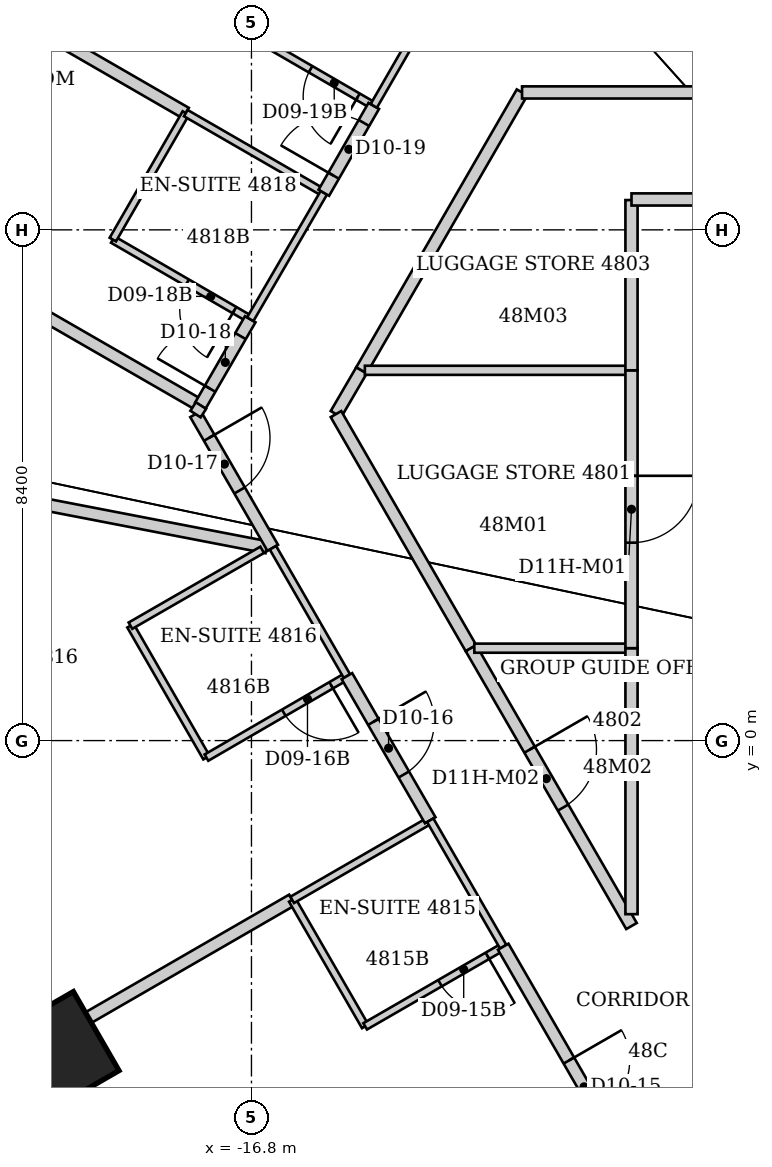
"""IFC4 building model, lengths in metres.
Left out: names, types, materials, properties, quantities, classifications, styles, units other than length and angle.
Written with IfcOpenShell. Run it as: python <this file> out.ifc"""

import sys

from ifc_helpers import new_model, si_unit, direction, frame, frame_2d, origin, origin_2d, place, context, subcontext, project, spatial, rectangle, extrude, element, fill, save


model = new_model("IFC4")
c1 = context("Model", 3, precision=1e-05, world=origin(), true_north=direction((0.0, 1.0)))
c2 = subcontext(c1, "Body", "Model", "MODEL_VIEW")
j1 = project(units=[si_unit("LENGTHUNIT", "METRE"), si_unit("PLANEANGLEUNIT", "RADIAN")], contexts=[c1])
p1 = place(None, origin())
s1 = spatial("IfcSite", under=j1, at=p1, CompositionType="ELEMENT")
p2 = place(p1, origin())
s2 = spatial("IfcBuilding", under=s1, at=p2, CompositionType="ELEMENT")
p3 = place(p2, frame((0.0, 0.0, 194.6)))
s3 = spatial("IfcBuildingStorey", under=s2, at=p3, CompositionType="ELEMENT", Elevation=194.6)
p4 = place(p3, frame((-20.003, -5.153, 0.0), z_axis=(0.0, 0.0, 1.0), x_axis=(-0.866025403784, -0.5, 0.0)))
e1 = element("IfcColumn", 1, at=p4, inside=s3, PredefinedType="COLUMN", context=c2, shape_type="SweptSolid", body=[
    extrude(rectangle(XDim=1.5, YDim=1.5, at=origin_2d()), origin(), (0.0, 0.0, 1.0), 3.8),
])
p5 = place(p3, frame((-27.041, 5.204, 0.0), z_axis=(0.0, 0.0, 1.0), x_axis=(0.981884490433, -0.18948046719, 0.0)))
e2 = element("IfcWall", 2, at=p5, inside=s3, PredefinedType="PARTITIONING", context=c2, shape_type="SweptSolid", body=[
    extrude(rectangle(XDim=10.684, YDim=0.2, at=frame_2d((5.342, 0.0))), origin(), (0.0, 0.0, 1.0), 3.64),
])
p6 = place(p3, frame((-22.866, 13.2, 0.0), z_axis=(0.0, 0.0, 1.0), x_axis=(0.865937714159, -0.500151852138, 0.0)))
e3 = element("IfcWall", 3, at=p6, inside=s3, PredefinedType="PARTITIONING", context=c2, shape_type="SweptSolid", body=[
    extrude(rectangle(XDim=5.758, YDim=0.2, at=frame_2d((2.879, 0.0))), origin(), (0.0, 0.0, 1.0), 2.878),
])
p7 = place(p3, frame((-21.116, -5.5, 0.0), z_axis=(0.0, 0.0, 1.0), x_axis=(0.865919350456, 0.50018364478, 0.0)))
e4 = element("IfcWall", 4, at=p7, inside=s3, PredefinedType="PARTITIONING", context=c2, shape_type="SweptSolid", body=[
    extrude(rectangle(XDim=5.758, YDim=0.2, at=frame_2d((2.879, 0.0))), origin(), (0.0, 0.0, 1.0), 3.64),
])
p8 = place(p3, frame((-20.97, 7.43, 0.0), z_axis=(0.0, 0.0, 1.0), x_axis=(0.866325681624, -0.499479542482, 0.0)))
e5 = element("IfcWall", 5, at=p8, inside=s3, PredefinedType="PARTITIONING", context=c2, shape_type="SweptSolid", body=[
    extrude(rectangle(XDim=3.829, YDim=0.2, at=frame_2d((1.914, 0.0))), origin(), (0.0, 0.0, 1.0), 3.64),
])
p9 = place(p3, frame((-19.08, 8.24, 0.0), z_axis=(0.0, 0.0, 1.0), x_axis=(0.865155281359, -0.50150407689, 0.0)))
e6 = element("IfcWall", 6, at=p9, inside=s3, PredefinedType="PARTITIONING", context=c2, shape_type="SweptSolid", body=[
    extrude(rectangle(XDim=2.612, YDim=0.12, at=frame_2d((1.306, 0.0))), origin(), (0.0, 0.0, 1.0), 3.64),
])
p10 = place(p9, frame((1.412, 0.0, 0.0)))
e7 = element("IfcOpeningElement", 7, at=p10, cuts=e6, PredefinedType="OPENING", context=c2, shape_type="SweptSolid", body=[
    extrude(rectangle(XDim=0.9, YDim=2.03, at=frame_2d((0.45, 1.015))), frame((0.0, 0.06, 0.0), z_axis=(0.0, -1.0, 0.0), x_axis=(1.0, 0.0, 0.0)), (0.0, 0.0, 1.0), 0.12),
])
p11 = place(p3, frame((-18.79, 1.89, 0.0), z_axis=(0.0, 0.0, 1.0), x_axis=(0.499159685399, -0.866510016372, 0.0)))
e8 = element("IfcWall", 8, at=p11, inside=s3, PredefinedType="PARTITIONING", context=c2, shape_type="SweptSolid", body=[
    extrude(rectangle(XDim=2.504, YDim=0.12, at=frame_2d((1.252, 0.0))), origin(), (0.0, 0.0, 1.0), 3.64),
])
p12 = place(p3, frame((-17.88, 10.32, 0.0), z_axis=(0.0, 0.0, 1.0), x_axis=(-0.499769390944, -0.866158505053, 0.0)))
e9 = element("IfcWall", 9, at=p12, inside=s3, PredefinedType="PARTITIONING", context=c2, shape_type="SweptSolid", body=[
    extrude(rectangle(XDim=2.402, YDim=0.12, at=frame_2d((1.201, 0.0))), origin(), (0.0, 0.0, 1.0), 3.64),
])
p13 = place(p3, frame((-17.88, 10.32, 0.0), z_axis=(0.0, 0.0, 1.0), x_axis=(0.866114241029, -0.499846097802, 0.0)))
e10 = element("IfcWall", 10, at=p13, inside=s3, PredefinedType="PARTITIONING", context=c2, shape_type="SweptSolid", body=[
    extrude(rectangle(XDim=2.621, YDim=0.12, at=frame_2d((1.311, 0.0))), origin(), (0.0, 0.0, 1.0), 2.878),
])
p14 = place(p3, frame((-17.72, 5.37, 0.0), z_axis=(0.0, 0.0, 1.0), x_axis=(0.499922110319, -0.866070368743, 0.0)))
e11 = element("IfcWall", 11, at=p14, inside=s3, PredefinedType="PARTITIONING", context=c2, shape_type="SweptSolid", body=[
    extrude(rectangle(XDim=2.541, YDim=0.2, at=frame_2d((1.27, 0.0))), origin(), (0.0, 0.0, 1.0), 3.64),
])
p15 = place(p14, frame((0.45, 0.0, 0.0)))
e12 = element("IfcOpeningElement", 12, at=p15, cuts=e11, PredefinedType="OPENING", context=c2, shape_type="SweptSolid", body=[
    extrude(rectangle(XDim=1.0, YDim=2.13, at=frame_2d((0.5, 1.065))), frame((0.0, 0.1, 0.0), z_axis=(0.0, -1.0, 0.0), x_axis=(1.0, 0.0, 0.0)), (0.0, 0.0, 1.0), 0.2),
])
p16 = place(p3, frame((-17.64, 5.51, 0.0), z_axis=(0.0, 0.0, 1.0), x_axis=(0.500014611105, 0.866016967894, 0.0)))
e13 = element("IfcWall", 13, at=p16, inside=s3, PredefinedType="PARTITIONING", context=c2, shape_type="SweptSolid", body=[
    extrude(rectangle(XDim=1.64, YDim=0.2, at=frame_2d((0.82, 0.0))), origin(), (0.0, 0.0, 1.0), 3.64),
])
p17 = place(p16, frame((0.32, 0.0, 0.0)))
e14 = element("IfcOpeningElement", 14, at=p17, cuts=e13, PredefinedType="OPENING", context=c2, shape_type="SweptSolid", body=[
    extrude(rectangle(XDim=1.0, YDim=2.13, at=frame_2d((0.5, 1.065))), frame((0.0, 0.1, 0.0), z_axis=(0.0, -1.0, 0.0), x_axis=(1.0, 0.0, 0.0)), (0.0, 0.0, 1.0), 0.2),
])
p18 = place(p3, frame((-17.63, 5.51, 0.0), z_axis=(0.0, 0.0, 1.0), x_axis=(-0.541424846284, -0.840749151547, 0.0)))
e15 = element("IfcWall", 15, at=p18, inside=s3, PredefinedType="PARTITIONING", context=c2, shape_type="SweptSolid", body=[
    extrude(rectangle(XDim=0.167, YDim=0.2, at=frame_2d((0.083, 0.0))), origin(), (0.0, 0.0, 1.0), 3.64),
])
p19 = place(p3, frame((-17.54, -0.28, 0.0), z_axis=(0.0, 0.0, 1.0), x_axis=(0.86498992408, 0.501789229896, 0.0)))
e16 = element("IfcWall", 16, at=p19, inside=s3, PredefinedType="PARTITIONING", context=c2, shape_type="SweptSolid", body=[
    extrude(rectangle(XDim=2.671, YDim=0.12, at=frame_2d((1.335, 0.0))), origin(), (0.0, 0.0, 1.0), 3.64),
])
p20 = place(p19, frame((1.47, 0.0, 0.0)))
e17 = element("IfcOpeningElement", 17, at=p20, cuts=e16, PredefinedType="OPENING", context=c2, shape_type="SweptSolid", body=[
    extrude(rectangle(XDim=0.9, YDim=2.03, at=frame_2d((0.45, 1.015))), frame((0.0, 0.06, 0.0), z_axis=(0.0, -1.0, 0.0), x_axis=(1.0, 0.0, 0.0)), (0.0, 0.0, 1.0), 0.12),
])
p21 = place(p3, frame((-17.05, 11.75, 0.0), z_axis=(0.0, 0.0, 1.0), x_axis=(0.865155281359, -0.50150407689, 0.0)))
e18 = element("IfcWall", 18, at=p21, inside=s3, PredefinedType="PARTITIONING", context=c2, shape_type="SweptSolid", body=[
    extrude(rectangle(XDim=2.612, YDim=0.12, at=frame_2d((1.306, 0.0))), origin(), (0.0, 0.0, 1.0), 3.64),
])
p22 = place(p21, frame((1.412, 0.0, 0.0)))
e19 = element("IfcOpeningElement", 19, at=p22, cuts=e18, PredefinedType="OPENING", context=c2, shape_type="SweptSolid", body=[
    extrude(rectangle(XDim=0.9, YDim=2.03, at=frame_2d((0.45, 1.015))), frame((0.0, 0.06, 0.0), z_axis=(0.0, -1.0, 0.0), x_axis=(1.0, 0.0, 0.0)), (0.0, 0.0, 1.0), 0.12),
])
p23 = place(p3, frame((-16.82, 6.93, 0.0), z_axis=(0.0, 0.0, 1.0), x_axis=(0.502810888564, 0.864396442809, 0.0)))
e20 = element("IfcWall", 20, at=p23, inside=s3, PredefinedType="PARTITIONING", context=c2, shape_type="SweptSolid", body=[
    extrude(rectangle(XDim=2.406, YDim=0.12, at=frame_2d((1.203, 0.0))), origin(), (0.0, 0.0, 1.0), 3.64),
])
p24 = place(p3, frame((-16.624, 3.138, 0.0), z_axis=(0.0, 0.0, 1.0), x_axis=(-0.866525185869, -0.499133351175, 0.0)))
e21 = element("IfcWall", 21, at=p24, inside=s3, PredefinedType="PARTITIONING", context=c2, shape_type="SweptSolid", body=[
    extrude(rectangle(XDim=2.5, YDim=0.12, at=frame_2d((1.25, 0.0))), origin(), (0.0, 0.0, 1.0), 3.038),
])
p25 = place(p3, frame((-16.447, 3.172, 0.0), z_axis=(0.0, 0.0, 1.0), x_axis=(0.499242543719, -0.86646227993, 0.0)))
e22 = element("IfcWall", 22, at=p25, inside=s3, PredefinedType="PARTITIONING", context=c2, shape_type="SweptSolid", body=[
    extrude(rectangle(XDim=2.437, YDim=0.12, at=frame_2d((1.219, 0.0))), origin(), (0.0, 0.0, 1.0), 3.64),
])
p26 = place(p3, frame((-16.13, -2.62, 0.0), z_axis=(0.0, 0.0, 1.0), x_axis=(0.499737123639, -0.866177122335, 0.0)))
e23 = element("IfcWall", 23, at=p26, inside=s3, PredefinedType="PARTITIONING", context=c2, shape_type="SweptSolid", body=[
    extrude(rectangle(XDim=2.401, YDim=0.12, at=frame_2d((1.201, 0.0))), origin(), (0.0, 0.0, 1.0), 3.64),
])
p27 = place(p3, frame((-16.13, -2.62, 0.0), z_axis=(0.0, 0.0, 1.0), x_axis=(0.866114241029, 0.499846097802, 0.0)))
e24 = element("IfcWall", 24, at=p27, inside=s3, PredefinedType="PARTITIONING", context=c2, shape_type="SweptSolid", body=[
    extrude(rectangle(XDim=2.621, YDim=0.12, at=frame_2d((1.311, 0.0))), origin(), (0.0, 0.0, 1.0), 3.64),
])
p28 = place(p3, frame((-15.61, 9.01, 0.0), z_axis=(0.0, 0.0, 1.0), x_axis=(0.498354254121, 0.866973492905, 0.0)))
e25 = element("IfcWall", 25, at=p28, inside=s3, PredefinedType="PARTITIONING", context=c2, shape_type="SweptSolid", body=[
    extrude(rectangle(XDim=1.648, YDim=0.2, at=frame_2d((0.824, 0.0))), origin(), (0.0, 0.0, 1.0), 3.64),
])
p29 = place(p28, frame((0.324, 0.0, 0.0)))
e26 = element("IfcOpeningElement", 26, at=p29, cuts=e25, PredefinedType="OPENING", context=c2, shape_type="SweptSolid", body=[
    extrude(rectangle(XDim=1.0, YDim=2.13, at=frame_2d((0.5, 1.065))), frame((0.0, 0.1, 0.0), z_axis=(0.0, -1.0, 0.0), x_axis=(1.0, 0.0, 0.0)), (0.0, 0.0, 1.0), 0.2),
])
p30 = place(p3, frame((-15.41, 5.37, 0.0), z_axis=(0.0, 0.0, 1.0), x_axis=(0.503943891868, 0.863736391412, 0.0)))
e27 = element("IfcWall", 27, at=p30, inside=s3, PredefinedType="PARTITIONING", context=c2, shape_type="SweptSolid", body=[
    extrude(rectangle(XDim=0.833, YDim=0.2, at=frame_2d((0.417, 0.0))), origin(), (0.0, 0.0, 1.0), 3.64),
])
p31 = place(p3, frame((-15.23, 1.06, 0.0), z_axis=(0.0, 0.0, 1.0), x_axis=(0.500406860043, -0.865790375565, 0.0)))
e28 = element("IfcWall", 28, at=p31, inside=s3, PredefinedType="PARTITIONING", context=c2, shape_type="SweptSolid", body=[
    extrude(rectangle(XDim=2.738, YDim=0.2, at=frame_2d((1.369, 0.0))), origin(), (0.0, 0.0, 1.0), 3.64),
])
p32 = place(p31, frame((0.869, 0.0, 0.0)))
e29 = element("IfcOpeningElement", 29, at=p32, cuts=e28, PredefinedType="OPENING", context=c2, shape_type="SweptSolid", body=[
    extrude(rectangle(XDim=1.0, YDim=2.13, at=frame_2d((0.5, 1.065))), frame((0.0, 0.1, 0.0), z_axis=(0.0, -1.0, 0.0), x_axis=(1.0, 0.0, 0.0)), (0.0, 0.0, 1.0), 0.2),
])
p33 = place(p3, frame((-14.99, 6.09, 0.0), z_axis=(0.0, 0.0, 1.0), x_axis=(0.500213626659, 0.86590203124, 0.0)))
e30 = element("IfcWall", 30, at=p33, inside=s3, PredefinedType="PARTITIONING", context=c2, shape_type="SweptSolid", body=[
    extrude(rectangle(XDim=5.278, YDim=0.2, at=frame_2d((2.639, 0.0))), origin(), (0.0, 0.0, 1.0), 3.64),
])
p34 = place(p3, frame((-14.935, 6.09, 0.0), z_axis=(0.0, 0.0, 1.0), x_axis=(1.0, 0.0, 0.0)))
e31 = element("IfcWall", 31, at=p34, inside=s3, PredefinedType="PARTITIONING", context=c2, shape_type="SweptSolid", body=[
    extrude(rectangle(XDim=4.385, YDim=0.15, at=frame_2d((2.192, 0.0))), origin(), (0.0, 0.0, 1.0), 3.64),
])
p35 = place(p3, frame((-14.93, -4.7, 0.0), z_axis=(0.0, 0.0, 1.0), x_axis=(0.866114241029, 0.499846097802, 0.0)))
e32 = element("IfcWall", 32, at=p35, inside=s3, PredefinedType="PARTITIONING", context=c2, shape_type="SweptSolid", body=[
    extrude(rectangle(XDim=2.621, YDim=0.12, at=frame_2d((1.311, 0.0))), origin(), (0.0, 0.0, 1.0), 3.64),
])
p36 = place(p35, frame((1.421, 0.0, 0.0)))
e33 = element("IfcOpeningElement", 33, at=p36, cuts=e32, PredefinedType="OPENING", context=c2, shape_type="SweptSolid", body=[
    extrude(rectangle(XDim=0.9, YDim=2.03, at=frame_2d((0.45, 1.015))), frame((0.0, 0.06, 0.0), z_axis=(0.0, -1.0, 0.0), x_axis=(1.0, 0.0, 0.0)), (0.0, 0.0, 1.0), 0.12),
])
p37 = place(p3, frame((-14.789, 10.439, 0.0), z_axis=(0.0, 0.0, 1.0), x_axis=(0.499942119333, 0.866058818624, 0.0)))
e34 = element("IfcWall", 34, at=p37, inside=s3, PredefinedType="PARTITIONING", context=c2, shape_type="SweptSolid", body=[
    extrude(rectangle(XDim=2.437, YDim=0.12, at=frame_2d((1.219, 0.0))), origin(), (0.0, 0.0, 1.0), 3.64),
])
p38 = place(p3, frame((-13.86, -1.31, 0.0), z_axis=(0.0, 0.0, 1.0), x_axis=(0.499813401482, -0.866133109688, 0.0)))
e35 = element("IfcWall", 35, at=p38, inside=s3, PredefinedType="PARTITIONING", context=c2, shape_type="SweptSolid", body=[
    extrude(rectangle(XDim=2.401, YDim=0.12, at=frame_2d((1.201, 0.0))), origin(), (0.0, 0.0, 1.0), 3.64),
])
p39 = place(p3, frame((-13.19, 1.52, 0.0), z_axis=(0.0, 0.0, 1.0), x_axis=(-0.499513190454, 0.866306281036, 0.0)))
e36 = element("IfcWall", 36, at=p39, inside=s3, PredefinedType="PARTITIONING", context=c2, shape_type="SweptSolid", body=[
    extrude(rectangle(XDim=4.444, YDim=0.2, at=frame_2d((2.222, 0.0))), origin(), (0.0, 0.0, 1.0), 3.64),
])
p40 = place(p3, frame((-12.66, -3.39, 0.0), z_axis=(0.0, 0.0, 1.0), x_axis=(0.499755544815, -0.866166494057, 0.0)))
e37 = element("IfcWall", 37, at=p40, inside=s3, PredefinedType="PARTITIONING", context=c2, shape_type="SweptSolid", body=[
    extrude(rectangle(XDim=5.323, YDim=0.2, at=frame_2d((2.661, 0.0))), origin(), (0.0, 0.0, 1.0), 3.64),
])
p41 = place(p40, frame((2.161, 0.0, 0.0)))
e38 = element("IfcOpeningElement", 38, at=p41, cuts=e37, PredefinedType="OPENING", context=c2, shape_type="SweptSolid", body=[
    extrude(rectangle(XDim=1.0, YDim=2.13, at=frame_2d((0.5, 1.065))), frame((0.0, 0.1, 0.0), z_axis=(0.0, -1.0, 0.0), x_axis=(1.0, 0.0, 0.0)), (0.0, 0.0, 1.0), 0.2),
])
p42 = place(p3, frame((-12.35, 10.66, 0.0), z_axis=(0.0, 0.0, 1.0), x_axis=(1.0, 0.0, 0.0)))
e39 = element("IfcWall", 39, at=p42, inside=s3, PredefinedType="PARTITIONING", context=c2, shape_type="SweptSolid", body=[
    extrude(rectangle(XDim=7.75, YDim=0.2, at=frame_2d((3.875, 0.0))), origin(), (0.0, 0.0, 1.0), 3.64),
])
p43 = place(p42, frame((3.325, 0.0, 0.0)))
e40 = element("IfcOpeningElement", 40, at=p43, cuts=e39, PredefinedType="OPENING", context=c2, shape_type="SweptSolid", body=[
    extrude(rectangle(XDim=1.1, YDim=2.2, at=frame_2d((0.55, 1.1))), frame((0.0, 0.1, 0.0), z_axis=(0.0, -1.0, 0.0), x_axis=(1.0, 0.0, 0.0)), (0.0, 0.0, 1.0), 0.2),
])
p44 = place(p3, frame((-10.55, -3.05, 0.0), z_axis=(0.0, 0.0, 1.0), x_axis=(-0.500193590286, 0.865913605527, 0.0)))
e41 = element("IfcWall", 41, at=p44, inside=s3, PredefinedType="PARTITIONING", context=c2, shape_type="SweptSolid", body=[
    extrude(rectangle(XDim=5.278, YDim=0.2, at=frame_2d((2.639, 0.0))), origin(), (0.0, 0.0, 1.0), 3.64),
])
p45 = place(p44, frame((2.25, 0.0, 0.0)))
e42 = element("IfcOpeningElement", 42, at=p45, cuts=e41, PredefinedType="OPENING", context=c2, shape_type="SweptSolid", body=[
    extrude(rectangle(XDim=1.1, YDim=2.2, at=frame_2d((0.55, 1.1))), frame((0.0, 0.1, 0.0), z_axis=(0.0, -1.0, 0.0), x_axis=(1.0, 0.0, 0.0)), (0.0, 0.0, 1.0), 0.2),
])
p46 = place(p3, frame((-10.55, 1.52, 0.0), z_axis=(0.0, 0.0, 1.0), x_axis=(-1.0, 0.0, 0.0)))
e43 = element("IfcWall", 43, at=p46, inside=s3, PredefinedType="PARTITIONING", context=c2, shape_type="SweptSolid", body=[
    extrude(rectangle(XDim=2.585, YDim=0.15, at=frame_2d((1.292, 0.0))), origin(), (0.0, 0.0, 1.0), 3.64),
])
p47 = place(p3, frame((-10.55, 1.52, 0.0), z_axis=(0.0, 0.0, 1.0), x_axis=(0.0, -1.0, 0.0)))
e44 = element("IfcWall", 44, at=p47, inside=s3, PredefinedType="PARTITIONING", context=c2, shape_type="SweptSolid", body=[
    extrude(rectangle(XDim=4.375, YDim=0.2, at=frame_2d((2.188, 0.0))), origin(), (0.0, 0.0, 1.0), 3.64),
])
p48 = place(p3, frame((-10.55, 6.09, 0.0), z_axis=(0.0, 0.0, 1.0), x_axis=(0.0, -1.0, 0.0)))
e45 = element("IfcWall", 45, at=p48, inside=s3, PredefinedType="PARTITIONING", context=c2, shape_type="SweptSolid", body=[
    extrude(rectangle(XDim=4.57, YDim=0.2, at=frame_2d((2.285, 0.0))), origin(), (0.0, 0.0, 1.0), 3.64),
])
p49 = place(p48, frame((1.735, 0.0, 0.0)))
e46 = element("IfcOpeningElement", 46, at=p49, cuts=e45, PredefinedType="OPENING", context=c2, shape_type="SweptSolid", body=[
    extrude(rectangle(XDim=1.1, YDim=2.2, at=frame_2d((0.55, 1.1))), frame((0.0, 0.1, 0.0), z_axis=(0.0, -1.0, 0.0), x_axis=(1.0, 0.0, 0.0)), (0.0, 0.0, 1.0), 0.2),
])
p50 = place(p3, frame((-10.55, 8.89, 0.0), z_axis=(0.0, 0.0, 1.0), x_axis=(0.0, -1.0, 0.0)))
e47 = element("IfcWall", 47, at=p50, inside=s3, PredefinedType="PARTITIONING", context=c2, shape_type="SweptSolid", body=[
    extrude(rectangle(XDim=2.8, YDim=0.2, at=frame_2d((1.4, 0.0))), origin(), (0.0, 0.0, 1.0), 3.64),
])
p51 = place(p3, frame((-4.6, 8.9, 0.0), z_axis=(0.0, 0.0, 1.0), x_axis=(-1.0, 0.0, 0.0)))
e48 = element("IfcWall", 48, at=p51, inside=s3, PredefinedType="PARTITIONING", context=c2, shape_type="SweptSolid", body=[
    extrude(rectangle(XDim=5.95, YDim=0.2, at=frame_2d((2.975, 0.0))), origin(), (0.0, 0.0, 1.0), 3.64),
])
p52 = place(p41, origin())
e49 = element("IfcDoor", 49, at=p52, inside=s3, OperationType="SINGLE_SWING_LEFT", PredefinedType="DOOR", context=c2, shape_type="SweptSolid", body=[
    extrude(rectangle(XDim=1.0, YDim=2.13, at=frame_2d((0.5, 1.065))), frame((0.0, 0.025, 0.0), z_axis=(0.0, -1.0, 0.0), x_axis=(1.0, 0.0, 0.0)), (0.0, 0.0, 1.0), 0.05),
])
fill(e38, e49)
p53 = place(p36, origin())
e50 = element("IfcDoor", 50, at=p53, inside=s3, OperationType="SINGLE_SWING_RIGHT", PredefinedType="DOOR", context=c2, shape_type="SweptSolid", body=[
    extrude(rectangle(XDim=0.9, YDim=2.03, at=frame_2d((0.45, 1.015))), frame((0.0, 0.025, 0.0), z_axis=(0.0, -1.0, 0.0), x_axis=(1.0, 0.0, 0.0)), (0.0, 0.0, 1.0), 0.05),
])
fill(e33, e50)
p54 = place(p32, origin())
e51 = element("IfcDoor", 51, at=p54, inside=s3, OperationType="SINGLE_SWING_LEFT", PredefinedType="DOOR", context=c2, shape_type="SweptSolid", body=[
    extrude(rectangle(XDim=1.0, YDim=2.13, at=frame_2d((0.5, 1.065))), frame((0.0, 0.025, 0.0), z_axis=(0.0, -1.0, 0.0), x_axis=(1.0, 0.0, 0.0)), (0.0, 0.0, 1.0), 0.05),
])
fill(e29, e51)
p55 = place(p20, origin())
e52 = element("IfcDoor", 52, at=p55, inside=s3, OperationType="SINGLE_SWING_RIGHT", PredefinedType="DOOR", context=c2, shape_type="SweptSolid", body=[
    extrude(rectangle(XDim=0.9, YDim=2.03, at=frame_2d((0.45, 1.015))), frame((0.0, 0.025, 0.0), z_axis=(0.0, -1.0, 0.0), x_axis=(1.0, 0.0, 0.0)), (0.0, 0.0, 1.0), 0.05),
])
fill(e17, e52)
p56 = place(p15, origin())
e53 = element("IfcDoor", 53, at=p56, inside=s3, OperationType="SINGLE_SWING_LEFT", PredefinedType="DOOR", context=c2, shape_type="SweptSolid", body=[
    extrude(rectangle(XDim=1.0, YDim=2.13, at=frame_2d((0.5, 1.065))), frame((0.0, 0.025, 0.0), z_axis=(0.0, -1.0, 0.0), x_axis=(1.0, 0.0, 0.0)), (0.0, 0.0, 1.0), 0.05),
])
fill(e12, e53)
p57 = place(p17, origin())
e54 = element("IfcDoor", 54, at=p57, inside=s3, OperationType="SINGLE_SWING_LEFT", PredefinedType="DOOR", context=c2, shape_type="SweptSolid", body=[
    extrude(rectangle(XDim=1.0, YDim=2.13, at=frame_2d((0.5, 1.065))), frame((0.0, 0.025, 0.0), z_axis=(0.0, -1.0, 0.0), x_axis=(1.0, 0.0, 0.0)), (0.0, 0.0, 1.0), 0.05),
])
fill(e14, e54)
p58 = place(p10, origin())
e55 = element("IfcDoor", 55, at=p58, inside=s3, OperationType="SINGLE_SWING_RIGHT", PredefinedType="DOOR", context=c2, shape_type="SweptSolid", body=[
    extrude(rectangle(XDim=0.9, YDim=2.03, at=frame_2d((0.45, 1.015))), frame((0.0, 0.025, 0.0), z_axis=(0.0, -1.0, 0.0), x_axis=(1.0, 0.0, 0.0)), (0.0, 0.0, 1.0), 0.05),
])
fill(e7, e55)
p59 = place(p29, origin())
e56 = element("IfcDoor", 56, at=p59, inside=s3, OperationType="SINGLE_SWING_LEFT", PredefinedType="DOOR", context=c2, shape_type="SweptSolid", body=[
    extrude(rectangle(XDim=1.0, YDim=2.13, at=frame_2d((0.5, 1.065))), frame((0.0, 0.025, 0.0), z_axis=(0.0, -1.0, 0.0), x_axis=(1.0, 0.0, 0.0)), (0.0, 0.0, 1.0), 0.05),
])
fill(e26, e56)
p60 = place(p22, origin())
e57 = element("IfcDoor", 57, at=p60, inside=s3, OperationType="SINGLE_SWING_RIGHT", PredefinedType="DOOR", context=c2, shape_type="SweptSolid", body=[
    extrude(rectangle(XDim=0.9, YDim=2.03, at=frame_2d((0.45, 1.015))), frame((0.0, 0.025, 0.0), z_axis=(0.0, -1.0, 0.0), x_axis=(1.0, 0.0, 0.0)), (0.0, 0.0, 1.0), 0.05),
])
fill(e19, e57)
p61 = place(p49, origin())
e58 = element("IfcDoor", 58, at=p61, inside=s3, OperationType="SINGLE_SWING_LEFT", PredefinedType="DOOR", context=c2, shape_type="SweptSolid", body=[
    extrude(rectangle(XDim=1.1, YDim=2.2, at=frame_2d((0.55, 1.1))), frame((0.0, 0.025, 0.0), z_axis=(0.0, -1.0, 0.0), x_axis=(1.0, 0.0, 0.0)), (0.0, 0.0, 1.0), 0.05),
])
fill(e46, e58)
p62 = place(p45, origin())
e59 = element("IfcDoor", 59, at=p62, inside=s3, OperationType="SINGLE_SWING_RIGHT", PredefinedType="DOOR", context=c2, shape_type="SweptSolid", body=[
    extrude(rectangle(XDim=1.1, YDim=2.2, at=frame_2d((0.55, 1.1))), frame((0.0, 0.025, 0.0), z_axis=(0.0, -1.0, 0.0), x_axis=(1.0, 0.0, 0.0)), (0.0, 0.0, 1.0), 0.05),
])
fill(e42, e59)
save(model, sys.argv[1])
